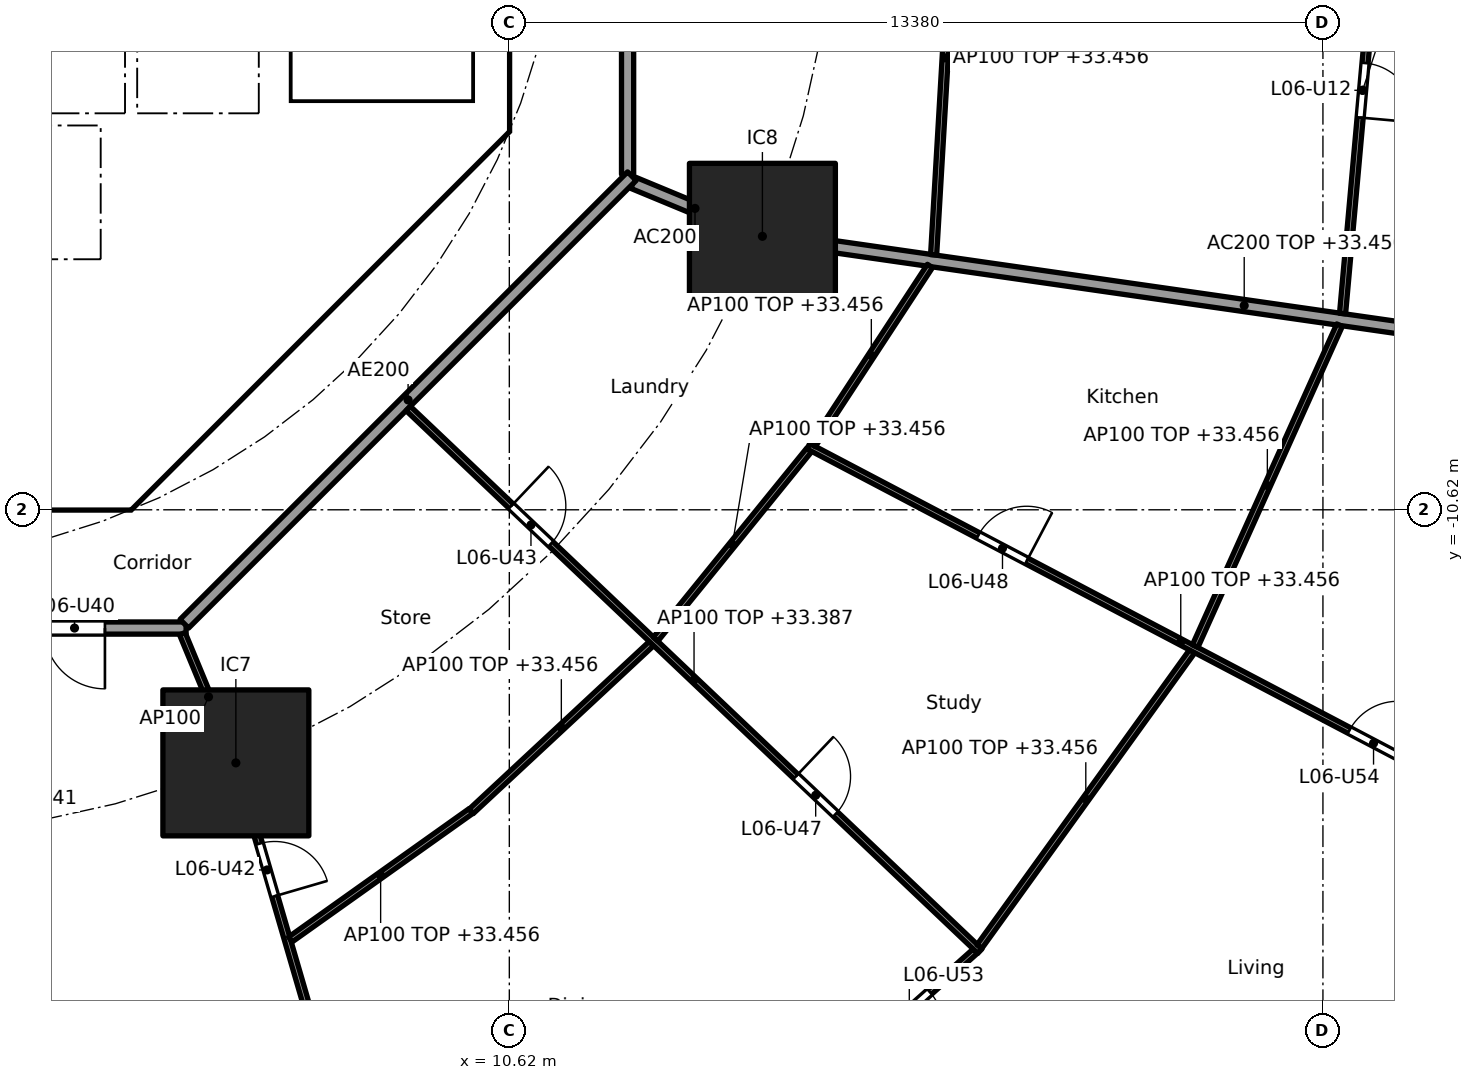
"""IFC4 building model, lengths in metres.
Left out: names, types, materials, properties, quantities, classifications, styles, units other than length and angle.
Written with IfcOpenShell. Run it as: python <this file> out.ifc"""

import sys

from ifc_helpers import new_model, si_unit, direction, frame, frame_2d, origin, origin_2d, place, context, subcontext, project, spatial, polyline, rectangle, outline, extrude, element, fill, save


model = new_model("IFC4")
c1 = context("Model", 3, precision=1e-05, world=origin(), true_north=direction((0.0, 1.0)))
c2 = subcontext(c1, "Body", "Model", "MODEL_VIEW")
j1 = project(units=[si_unit("LENGTHUNIT", "METRE"), si_unit("PLANEANGLEUNIT", "RADIAN")], contexts=[c1])
p1 = place(None, origin())
s1 = spatial("IfcSite", under=j1, at=p1, CompositionType="ELEMENT")
p2 = place(p1, origin())
s2 = spatial("IfcBuilding", under=s1, at=p2, CompositionType="ELEMENT")
p3 = place(p2, frame((0.0, 0.0, 30.7)))
s3 = spatial("IfcBuildingStorey", under=s2, at=p3, CompositionType="ELEMENT", Elevation=30.7)
for number, where, z_axis, x_axis in (
    (1, (6.123, -14.782, 0.0), (0.0, 0.0, 1.0), (1.0, 0.0, 0.0)),
    (2, (14.782, -6.123, 0.0), (0.0, 0.0, 1.0), (1.0, 0.0, 0.0)),
):
    element("IfcColumn", number, at=place(p3, frame(where, z_axis=z_axis, x_axis=x_axis)), inside=s3, PredefinedType="COLUMN", context=c2, shape_type="SweptSolid", body=[
        extrude(rectangle(XDim=2.4, YDim=2.4, at=origin_2d()), origin(), (0.0, 0.0, 1.0), 3.7),
    ])
p4 = place(p3, frame((4.613, -9.988, 0.0), z_axis=(0.0, 0.0, 1.0), x_axis=(0.707106781187, 0.707106781187, 0.0)))
e3 = element("IfcWall", 3, at=p4, inside=s3, PredefinedType="SHEAR", context=c2, shape_type="SweptSolid", body=[
    extrude(rectangle(XDim=7.602, YDim=0.6, at=frame_2d((3.801, 0.0))), origin(), (0.0, 0.0, 1.0), 3.44),
])
p5 = place(p4, frame((3.201, 0.0, 0.0)))
e4 = element("IfcOpeningElement", 4, at=p5, cuts=e3, PredefinedType="OPENING", context=c2, shape_type="SweptSolid", body=[
    extrude(rectangle(XDim=1.2, YDim=2.1, at=frame_2d((0.6, 1.05))), frame((0.0, 0.31, 0.0), z_axis=(0.0, -1.0, 0.0), x_axis=(1.0, 0.0, 0.0)), (0.0, 0.0, 1.0), 0.62),
])
p6 = place(p3, frame((4.0, -10.025, 0.0), z_axis=(0.0, 0.0, 1.0), x_axis=(0.0, 1.0, 0.0)))
e5 = element("IfcWall", 5, at=p6, inside=s3, PredefinedType="SOLIDWALL", context=c2, shape_type="SweptSolid", body=[
    extrude(rectangle(XDim=3.0, YDim=0.2, at=frame_2d((1.5, 0.0))), origin(), (0.0, 0.0, 1.0), 3.44),
])
p7 = place(p6, frame((0.975, 0.0, 0.0)))
e6 = element("IfcOpeningElement", 6, at=p7, cuts=e5, PredefinedType="OPENING", context=c2, shape_type="SweptSolid", body=[
    extrude(rectangle(XDim=1.1, YDim=2.1, at=frame_2d((0.55, 1.05))), frame((0.0, 0.11, 0.0), z_axis=(0.0, -1.0, 0.0), x_axis=(1.0, 0.0, 0.0)), (0.0, 0.0, 1.0), 0.22),
])
p8 = place(p3, frame((4.0, -6.5, 0.0), z_axis=(0.0, 0.0, 1.0), x_axis=(0.0, 1.0, 0.0)))
e7 = element("IfcWall", 7, at=p8, inside=s3, PredefinedType="SOLIDWALL", context=c2, shape_type="SweptSolid", body=[
    extrude(rectangle(XDim=2.2, YDim=0.2, at=frame_2d((1.1, 0.0))), origin(), (0.0, 0.0, 1.0), 3.44),
])
p9 = place(p8, frame((0.55, 0.0, 0.0)))
e8 = element("IfcOpeningElement", 8, at=p9, cuts=e7, PredefinedType="OPENING", context=c2, shape_type="SweptSolid", body=[
    extrude(rectangle(XDim=1.1, YDim=2.1, at=frame_2d((0.55, 1.05))), frame((0.0, 0.11, 0.0), z_axis=(0.0, -1.0, 0.0), x_axis=(1.0, 0.0, 0.0)), (0.0, 0.0, 1.0), 0.22),
])
p10 = place(p3, origin())
e9 = element("IfcWall", 9, at=p10, inside=s3, PredefinedType="SHEAR", context=c2, shape_type="SweptSolid", body=[
    extrude(outline(polyline([(-4.152, -10.025), (4.152, -10.025), (4.401, -9.776), (4.825, -10.2), (4.401, -10.625), (-4.401, -10.625), (-4.825, -10.2), (-4.401, -9.776), (-4.152, -10.025)])), origin(), (0.0, 0.0, 1.0), 3.44),
])
p11 = place(p3, origin())
e10 = element("IfcWall", 10, at=p11, inside=s3, PredefinedType="SHEAR", context=c2, shape_type="SweptSolid", body=[
    extrude(outline(polyline([(9.776, -4.401), (10.025, -4.152), (10.025, -3.801), (10.025, 4.152), (9.776, 4.401), (10.2, 4.825), (10.625, 4.401), (10.625, -4.401), (10.2, -4.825), (9.776, -4.401)])), origin(), (0.0, 0.0, 1.0), 3.44),
])
p12 = place(p3, origin())
e11 = element("IfcWall", 11, at=p12, inside=s3, PredefinedType="SOLIDWALL", context=c2, shape_type="SweptSolid", body=[
    extrude(outline(polyline([(-6.7, -2.1), (-6.5, -2.1), (-6.5, -4.1), (-4.5, -4.1), (-4.5, -2.1), (-4.3, -2.1), (-4.3, -4.1), (-2.3, -4.1), (-2.3, -2.1), (-2.1, -2.1), (-2.1, -4.1), (-0.1, -4.1), (-0.1, -2.1), (0.1, -2.1), (0.1, -4.1), (2.1, -4.1), (2.1, -2.1), (2.3, -2.1), (2.3, -4.1), (4.3, -4.1), (4.3, -2.1), (4.5, -2.1), (4.5, -4.1), (6.5, -4.1), (6.5, -2.1), (6.7, -2.1), (6.7, -4.3), (-6.7, -4.3), (-6.7, -2.1)])), origin(), (0.0, 0.0, 1.0), 3.44),
])
p13 = place(p3, origin())
e12 = element("IfcWall", 12, at=p13, inside=s3, PredefinedType="SOLIDWALL", context=c2, shape_type="SweptSolid", body=[
    extrude(outline(polyline([(4.1, -7.025), (-4.1, -7.025), (-4.1, -6.5), (4.1, -6.5), (4.1, -7.025)])), origin(), (0.0, 0.0, 1.0), 3.44),
])
p14 = place(p3, origin())
e13 = element("IfcWall", 13, at=p14, inside=s3, PredefinedType="SOLIDWALL", context=c2, shape_type="SweptSolid", body=[
    extrude(outline(polyline([(7.025, -3.9), (6.7, -3.9), (6.7, 3.9), (7.025, 3.9), (7.025, -3.9)])), origin(), (0.0, 0.0, 1.0), 3.44),
])
p15 = place(p3, origin())
e14 = element("IfcWall", 14, at=p15, inside=s3, PredefinedType="SOLIDWALL", context=c2, shape_type="SweptSolid", body=[
    extrude(outline(polyline([(10.025, -4.1), (6.7, -4.1), (6.7, -3.9), (10.025, -3.9), (10.025, -4.1)])), origin(), (0.0, 0.0, 1.0), 3.44),
])
p16 = place(p3, frame((12.657, -5.243, 0.0), z_axis=(0.0, 0.0, 1.0), x_axis=(0.923853160736, -0.382747093259, 0.0)))
e15 = element("IfcWall", 15, at=p16, inside=s3, PredefinedType="PARTITIONING", context=c2, shape_type="SweptSolid", body=[
    extrude(rectangle(XDim=2.2, YDim=0.2, at=frame_2d((1.1, 0.0))), origin(), (0.0, 0.0, 1.0), 3.44),
])
p17 = place(p3, frame((14.832, -6.13, 0.0), z_axis=(0.0, 0.0, 1.0), x_axis=(0.989836541293, -0.142209779978, 0.0)))
e16 = element("IfcWall", 16, at=p17, inside=s3, PredefinedType="PARTITIONING", context=c2, shape_type="SweptSolid", body=[
    extrude(rectangle(XDim=15.909, YDim=0.2, at=frame_2d((7.955, 0.0))), origin(), (0.0, 0.0, 1.0), 2.756),
])
p18 = place(p3, frame((12.565, -5.104, 0.0), z_axis=(0.0, 0.0, 1.0), x_axis=(0.0, 1.0, 0.0)))
e17 = element("IfcWall", 17, at=p18, inside=s3, PredefinedType="PARTITIONING", context=c2, shape_type="SweptSolid", body=[
    extrude(rectangle(XDim=10.209, YDim=0.2, at=frame_2d((5.104, 0.0))), origin(), (0.0, 0.0, 1.0), 3.44),
])
p19 = place(p3, frame((-5.104, -12.565, 0.0), z_axis=(0.0, 0.0, 1.0), x_axis=(1.0, 0.0, 0.0)))
e18 = element("IfcWall", 18, at=p19, inside=s3, PredefinedType="PARTITIONING", context=c2, shape_type="SweptSolid", body=[
    extrude(rectangle(XDim=10.409, YDim=0.2, at=frame_2d((5.205, 0.0))), origin(), (0.0, 0.0, 1.0), 3.44),
])
p20 = place(p19, frame((8.074, 0.0, 0.0)))
e19 = element("IfcOpeningElement", 19, at=p20, cuts=e18, PredefinedType="OPENING", context=c2, shape_type="SweptSolid", body=[
    extrude(rectangle(XDim=1.0, YDim=2.1, at=frame_2d((0.5, 1.05))), frame((0.0, 0.11, 0.0), z_axis=(0.0, -1.0, 0.0), x_axis=(1.0, 0.0, 0.0)), (0.0, 0.0, 1.0), 0.22),
])
p21 = place(p3, frame((5.275, -12.494, 0.0), z_axis=(0.0, 0.0, 1.0), x_axis=(0.707106781187, 0.707106781187, 0.0)))
e20 = element("IfcWall", 20, at=p21, inside=s3, PredefinedType="PARTITIONING", context=c2, shape_type="SweptSolid", body=[
    extrude(rectangle(XDim=10.409, YDim=0.2, at=frame_2d((5.205, 0.0))), origin(), (0.0, 0.0, 1.0), 3.44),
])
p22 = place(p3, frame((17.977, 0.05, 0.0), z_axis=(0.0, 0.0, 1.0), x_axis=(-0.058516864568, -0.998286420103, 0.0)))
e21 = element("IfcWall", 21, at=p22, inside=s3, PredefinedType="PARTITIONING", context=c2, shape_type="SweptSolid", body=[
    extrude(rectangle(XDim=6.488, YDim=0.1, at=frame_2d((3.244, 0.0))), origin(), (0.0, 0.0, 1.0), 2.756),
])
p23 = place(p3, frame((24.982, -0.05, 0.0), z_axis=(0.0, 0.0, 1.0), x_axis=(-0.08944290521, -0.995991951126, 0.0)))
e22 = element("IfcWall", 22, at=p23, inside=s3, PredefinedType="PARTITIONING", context=c2, shape_type="SweptSolid", body=[
    extrude(rectangle(XDim=7.373, YDim=0.1, at=frame_2d((3.686, 0.0))), origin(), (0.0, 0.0, 1.0), 2.756),
])
p24 = place(p23, frame((3.236, 0.0, 0.0)))
e23 = element("IfcOpeningElement", 23, at=p24, cuts=e22, PredefinedType="OPENING", context=c2, shape_type="SweptSolid", body=[
    extrude(rectangle(XDim=0.9, YDim=2.1, at=frame_2d((0.45, 1.05))), frame((0.0, 0.06, 0.0), z_axis=(0.0, -1.0, 0.0), x_axis=(1.0, 0.0, 0.0)), (0.0, 0.0, 1.0), 0.12),
])
p25 = place(p3, frame((1.744, -12.664, 0.0), z_axis=(0.0, 0.0, 1.0), x_axis=(0.090893639596, -0.995860605849, 0.0)))
e24 = element("IfcWall", 24, at=p25, inside=s3, PredefinedType="PARTITIONING", context=c2, shape_type="SweptSolid", body=[
    extrude(rectangle(XDim=19.374, YDim=0.1, at=frame_2d((9.687, 0.0))), origin(), (0.0, 0.0, 1.0), 2.687),
])
p26 = place(p25, frame((2.27, 0.0, 0.0)))
e25 = element("IfcOpeningElement", 25, at=p26, cuts=e24, PredefinedType="OPENING", context=c2, shape_type="SweptSolid", body=[
    extrude(rectangle(XDim=0.9, YDim=2.1, at=frame_2d((0.45, 1.05))), frame((0.0, 0.06, 0.0), z_axis=(0.0, -1.0, 0.0), x_axis=(1.0, 0.0, 0.0)), (0.0, 0.0, 1.0), 0.12),
])
p27 = place(p25, frame((8.582, 0.0, 0.0)))
e26 = element("IfcOpeningElement", 26, at=p27, cuts=e24, PredefinedType="OPENING", context=c2, shape_type="SweptSolid", body=[
    extrude(rectangle(XDim=0.9, YDim=2.1, at=frame_2d((0.45, 1.05))), frame((0.0, 0.06, 0.0), z_axis=(0.0, -1.0, 0.0), x_axis=(1.0, 0.0, 0.0)), (0.0, 0.0, 1.0), 0.12),
])
p28 = place(p25, frame((15.548, 0.0, 0.0)))
e27 = element("IfcOpeningElement", 27, at=p28, cuts=e24, PredefinedType="OPENING", context=c2, shape_type="SweptSolid", body=[
    extrude(rectangle(XDim=0.9, YDim=2.1, at=frame_2d((0.45, 1.05))), frame((0.0, 0.06, 0.0), z_axis=(0.0, -1.0, 0.0), x_axis=(1.0, 0.0, 0.0)), (0.0, 0.0, 1.0), 0.12),
])
p29 = place(p3, frame((5.243, -12.657, 0.0), z_axis=(0.0, 0.0, 1.0), x_axis=(0.382719158442, -0.923864733477, 0.0)))
e28 = element("IfcWall", 28, at=p29, inside=s3, PredefinedType="PARTITIONING", context=c2, shape_type="SweptSolid", body=[
    extrude(rectangle(XDim=2.25, YDim=0.1, at=frame_2d((1.125, 0.0))), origin(), (0.0, 0.0, 1.0), 3.44),
])
p30 = place(p3, frame((6.137, -14.83, 0.0), z_axis=(0.0, 0.0, 1.0), x_axis=(0.279843546189, -0.960045618529, 0.0)))
e29 = element("IfcWall", 29, at=p30, inside=s3, PredefinedType="PARTITIONING", context=c2, shape_type="SweptSolid", body=[
    extrude(rectangle(XDim=10.127, YDim=0.1, at=frame_2d((5.063, 0.0))), origin(), (0.0, 0.0, 1.0), 3.44),
])
p31 = place(p30, frame((1.334, 0.0, 0.0)))
e30 = element("IfcOpeningElement", 30, at=p31, cuts=e29, PredefinedType="OPENING", context=c2, shape_type="SweptSolid", body=[
    extrude(rectangle(XDim=0.9, YDim=2.1, at=frame_2d((0.45, 1.05))), frame((0.0, 0.06, 0.0), z_axis=(0.0, -1.0, 0.0), x_axis=(1.0, 0.0, 0.0)), (0.0, 0.0, 1.0), 0.12),
])
p32 = place(p30, frame((6.091, 0.0, 0.0)))
e31 = element("IfcOpeningElement", 31, at=p32, cuts=e29, PredefinedType="OPENING", context=c2, shape_type="SweptSolid", body=[
    extrude(rectangle(XDim=0.9, YDim=2.1, at=frame_2d((0.45, 1.05))), frame((0.0, 0.06, 0.0), z_axis=(0.0, -1.0, 0.0), x_axis=(1.0, 0.0, 0.0)), (0.0, 0.0, 1.0), 0.12),
])
p33 = place(p3, frame((7.019, -17.686, 0.0), z_axis=(0.0, 0.0, 1.0), x_axis=(0.81494477814, 0.57953861699, 0.0)))
e32 = element("IfcWall", 32, at=p33, inside=s3, PredefinedType="PARTITIONING", context=c2, shape_type="SweptSolid", body=[
    extrude(rectangle(XDim=3.644, YDim=0.1, at=frame_2d((1.822, 0.0))), origin(), (0.0, 0.0, 1.0), 2.756),
])
p34 = place(p3, frame((9.993, -15.579, 0.0), z_axis=(0.0, 0.0, 1.0), x_axis=(0.732028724098, 0.681273768096, 0.0)))
e33 = element("IfcWall", 33, at=p34, inside=s3, PredefinedType="PARTITIONING", context=c2, shape_type="SweptSolid", body=[
    extrude(rectangle(XDim=4.05, YDim=0.1, at=frame_2d((2.025, 0.0))), origin(), (0.0, 0.0, 1.0), 2.756),
])
p35 = place(p3, frame((13.862, -21.828, 0.0), z_axis=(0.0, 0.0, 1.0), x_axis=(0.745812746724, 0.666155647596, 0.0)))
e34 = element("IfcWall", 34, at=p35, inside=s3, PredefinedType="PARTITIONING", context=c2, shape_type="SweptSolid", body=[
    extrude(rectangle(XDim=5.931, YDim=0.1, at=frame_2d((2.965, 0.0))), origin(), (0.0, 0.0, 1.0), 2.756),
])
p36 = place(p35, frame((4.023, 0.0, 0.0)))
e35 = element("IfcOpeningElement", 35, at=p36, cuts=e34, PredefinedType="OPENING", context=c2, shape_type="SweptSolid", body=[
    extrude(rectangle(XDim=0.9, YDim=2.1, at=frame_2d((0.45, 1.05))), frame((0.0, 0.06, 0.0), z_axis=(0.0, -1.0, 0.0), x_axis=(1.0, 0.0, 0.0)), (0.0, 0.0, 1.0), 0.12),
])
p37 = place(p3, frame((8.957, -8.953, 0.0), z_axis=(0.0, 0.0, 1.0), x_axis=(0.725250022034, -0.688485588476, 0.0)))
e36 = element("IfcWall", 36, at=p37, inside=s3, PredefinedType="PARTITIONING", context=c2, shape_type="SweptSolid", body=[
    extrude(rectangle(XDim=12.963, YDim=0.1, at=frame_2d((6.481, 0.0))), origin(), (0.0, 0.0, 1.0), 2.687),
])
p38 = place(p37, frame((2.333, 0.0, 0.0)))
e37 = element("IfcOpeningElement", 37, at=p38, cuts=e36, PredefinedType="OPENING", context=c2, shape_type="SweptSolid", body=[
    extrude(rectangle(XDim=0.9, YDim=2.1, at=frame_2d((0.45, 1.05))), frame((0.0, 0.06, 0.0), z_axis=(0.0, -1.0, 0.0), x_axis=(1.0, 0.0, 0.0)), (0.0, 0.0, 1.0), 0.12),
])
p39 = place(p37, frame((8.79, 0.0, 0.0)))
e38 = element("IfcOpeningElement", 38, at=p39, cuts=e36, PredefinedType="OPENING", context=c2, shape_type="SweptSolid", body=[
    extrude(rectangle(XDim=0.9, YDim=2.1, at=frame_2d((0.45, 1.05))), frame((0.0, 0.06, 0.0), z_axis=(0.0, -1.0, 0.0), x_axis=(1.0, 0.0, 0.0)), (0.0, 0.0, 1.0), 0.12),
])
p40 = place(p3, frame((13.026, -12.747, 0.0), z_axis=(0.0, 0.0, 1.0), x_axis=(0.630126826288, 0.776492229705, 0.0)))
e39 = element("IfcWall", 39, at=p40, inside=s3, PredefinedType="PARTITIONING", context=c2, shape_type="SweptSolid", body=[
    extrude(rectangle(XDim=4.007, YDim=0.1, at=frame_2d((2.003, 0.0))), origin(), (0.0, 0.0, 1.0), 2.756),
])
p41 = place(p3, frame((18.351, -17.803, 0.0), z_axis=(0.0, 0.0, 1.0), x_axis=(0.584563700282, 0.811347817099, 0.0)))
e40 = element("IfcWall", 40, at=p41, inside=s3, PredefinedType="PARTITIONING", context=c2, shape_type="SweptSolid", body=[
    extrude(rectangle(XDim=5.984, YDim=0.1, at=frame_2d((2.992, 0.0))), origin(), (0.0, 0.0, 1.0), 2.756),
])
p42 = place(p3, frame((15.538, -9.574, 0.0), z_axis=(0.0, 0.0, 1.0), x_axis=(0.885181406501, -0.465246039838, 0.0)))
e41 = element("IfcWall", 41, at=p42, inside=s3, PredefinedType="PARTITIONING", context=c2, shape_type="SweptSolid", body=[
    extrude(rectangle(XDim=13.837, YDim=0.1, at=frame_2d((6.918, 0.0))), origin(), (0.0, 0.0, 1.0), 2.756),
])
p43 = place(p42, frame((3.156, 0.0, 0.0)))
e42 = element("IfcOpeningElement", 42, at=p43, cuts=e41, PredefinedType="OPENING", context=c2, shape_type="SweptSolid", body=[
    extrude(rectangle(XDim=0.9, YDim=2.1, at=frame_2d((0.45, 1.05))), frame((0.0, 0.06, 0.0), z_axis=(0.0, -1.0, 0.0), x_axis=(1.0, 0.0, 0.0)), (0.0, 0.0, 1.0), 0.12),
])
p44 = place(p42, frame((10.05, 0.0, 0.0)))
e43 = element("IfcOpeningElement", 43, at=p44, cuts=e41, PredefinedType="OPENING", context=c2, shape_type="SweptSolid", body=[
    extrude(rectangle(XDim=0.9, YDim=2.1, at=frame_2d((0.45, 1.05))), frame((0.0, 0.06, 0.0), z_axis=(0.0, -1.0, 0.0), x_axis=(1.0, 0.0, 0.0)), (0.0, 0.0, 1.0), 0.12),
])
p45 = place(p3, frame((15.609, -9.556, 0.0), z_axis=(0.0, 0.0, 1.0), x_axis=(0.547637987196, 0.836715384692, 0.0)))
e44 = element("IfcWall", 44, at=p45, inside=s3, PredefinedType="PARTITIONING", context=c2, shape_type="SweptSolid", body=[
    extrude(rectangle(XDim=3.52, YDim=0.1, at=frame_2d((1.76, 0.0))), origin(), (0.0, 0.0, 1.0), 2.756),
])
p46 = place(p3, frame((21.899, -12.861, 0.0), z_axis=(0.0, 0.0, 1.0), x_axis=(0.410201529109, 0.911994904326, 0.0)))
e45 = element("IfcWall", 45, at=p46, inside=s3, PredefinedType="PARTITIONING", context=c2, shape_type="SweptSolid", body=[
    extrude(rectangle(XDim=5.787, YDim=0.1, at=frame_2d((2.894, 0.0))), origin(), (0.0, 0.0, 1.0), 2.756),
])
p47 = place(p9, origin())
e46 = element("IfcDoor", 46, at=p47, inside=s3, OperationType="DOUBLE_DOOR_SLIDING", PredefinedType="DOOR", context=c2, shape_type="SweptSolid", body=[
    extrude(rectangle(XDim=1.1, YDim=2.1, at=frame_2d((0.55, 1.05))), frame((0.0, 0.025, 0.0), z_axis=(0.0, -1.0, 0.0), x_axis=(1.0, 0.0, 0.0)), (0.0, 0.0, 1.0), 0.05),
])
fill(e8, e46)
p48 = place(p7, origin())
e47 = element("IfcDoor", 47, at=p48, inside=s3, OperationType="SINGLE_SWING_LEFT", PredefinedType="DOOR", context=c2, shape_type="SweptSolid", body=[
    extrude(rectangle(XDim=1.1, YDim=2.1, at=frame_2d((0.55, 1.05))), frame((0.0, 0.025, 0.0), z_axis=(0.0, -1.0, 0.0), x_axis=(1.0, 0.0, 0.0)), (0.0, 0.0, 1.0), 0.05),
])
fill(e6, e47)
p49 = place(p5, origin())
e48 = element("IfcDoor", 48, at=p49, inside=s3, OperationType="SINGLE_SWING_RIGHT", PredefinedType="DOOR", context=c2, shape_type="SweptSolid", body=[
    extrude(rectangle(XDim=1.2, YDim=2.1, at=frame_2d((0.6, 1.05))), frame((0.0, 0.025, 0.0), z_axis=(0.0, -1.0, 0.0), x_axis=(1.0, 0.0, 0.0)), (0.0, 0.0, 1.0), 0.05),
])
fill(e4, e48)
p50 = place(p24, origin())
e49 = element("IfcDoor", 49, at=p50, inside=s3, OperationType="SINGLE_SWING_RIGHT", PredefinedType="DOOR", context=c2, shape_type="SweptSolid", body=[
    extrude(rectangle(XDim=0.9, YDim=2.1, at=frame_2d((0.45, 1.05))), frame((0.0, 0.025, 0.0), z_axis=(0.0, -1.0, 0.0), x_axis=(1.0, 0.0, 0.0)), (0.0, 0.0, 1.0), 0.05),
])
fill(e23, e49)
p51 = place(p20, frame((1.0, 0.0, 0.0), x_axis=(-1.0, 0.0, 0.0)))
e50 = element("IfcDoor", 50, at=p51, inside=s3, OperationType="SINGLE_SWING_LEFT", PredefinedType="DOOR", context=c2, shape_type="SweptSolid", body=[
    extrude(rectangle(XDim=1.0, YDim=2.1, at=frame_2d((0.5, 1.05))), frame((0.0, 0.025, 0.0), z_axis=(0.0, -1.0, 0.0), x_axis=(1.0, 0.0, 0.0)), (0.0, 0.0, 1.0), 0.05),
])
fill(e19, e50)
p52 = place(p31, origin())
e51 = element("IfcDoor", 51, at=p52, inside=s3, OperationType="SINGLE_SWING_RIGHT", PredefinedType="DOOR", context=c2, shape_type="SweptSolid", body=[
    extrude(rectangle(XDim=0.9, YDim=2.1, at=frame_2d((0.45, 1.05))), frame((0.0, 0.025, 0.0), z_axis=(0.0, -1.0, 0.0), x_axis=(1.0, 0.0, 0.0)), (0.0, 0.0, 1.0), 0.05),
])
fill(e30, e51)
p53 = place(p38, origin())
e52 = element("IfcDoor", 52, at=p53, inside=s3, OperationType="SINGLE_SWING_LEFT", PredefinedType="DOOR", context=c2, shape_type="SweptSolid", body=[
    extrude(rectangle(XDim=0.9, YDim=2.1, at=frame_2d((0.45, 1.05))), frame((0.0, 0.025, 0.0), z_axis=(0.0, -1.0, 0.0), x_axis=(1.0, 0.0, 0.0)), (0.0, 0.0, 1.0), 0.05),
])
fill(e37, e52)
p54 = place(p39, origin())
e53 = element("IfcDoor", 53, at=p54, inside=s3, OperationType="SINGLE_SWING_LEFT", PredefinedType="DOOR", context=c2, shape_type="SweptSolid", body=[
    extrude(rectangle(XDim=0.9, YDim=2.1, at=frame_2d((0.45, 1.05))), frame((0.0, 0.025, 0.0), z_axis=(0.0, -1.0, 0.0), x_axis=(1.0, 0.0, 0.0)), (0.0, 0.0, 1.0), 0.05),
])
fill(e38, e53)
p55 = place(p43, origin())
e54 = element("IfcDoor", 54, at=p55, inside=s3, OperationType="SINGLE_SWING_RIGHT", PredefinedType="DOOR", context=c2, shape_type="SweptSolid", body=[
    extrude(rectangle(XDim=0.9, YDim=2.1, at=frame_2d((0.45, 1.05))), frame((0.0, 0.025, 0.0), z_axis=(0.0, -1.0, 0.0), x_axis=(1.0, 0.0, 0.0)), (0.0, 0.0, 1.0), 0.05),
])
fill(e42, e54)
p56 = place(p36, frame((0.9, 0.0, 0.0), x_axis=(-1.0, 0.0, 0.0)))
e55 = element("IfcDoor", 55, at=p56, inside=s3, OperationType="SINGLE_SWING_RIGHT", PredefinedType="DOOR", context=c2, shape_type="SweptSolid", body=[
    extrude(rectangle(XDim=0.9, YDim=2.1, at=frame_2d((0.45, 1.05))), frame((0.0, 0.025, 0.0), z_axis=(0.0, -1.0, 0.0), x_axis=(1.0, 0.0, 0.0)), (0.0, 0.0, 1.0), 0.05),
])
fill(e35, e55)
p57 = place(p44, origin())
e56 = element("IfcDoor", 56, at=p57, inside=s3, OperationType="SINGLE_SWING_RIGHT", PredefinedType="DOOR", context=c2, shape_type="SweptSolid", body=[
    extrude(rectangle(XDim=0.9, YDim=2.1, at=frame_2d((0.45, 1.05))), frame((0.0, 0.025, 0.0), z_axis=(0.0, -1.0, 0.0), x_axis=(1.0, 0.0, 0.0)), (0.0, 0.0, 1.0), 0.05),
])
fill(e43, e56)
save(model, sys.argv[1])
